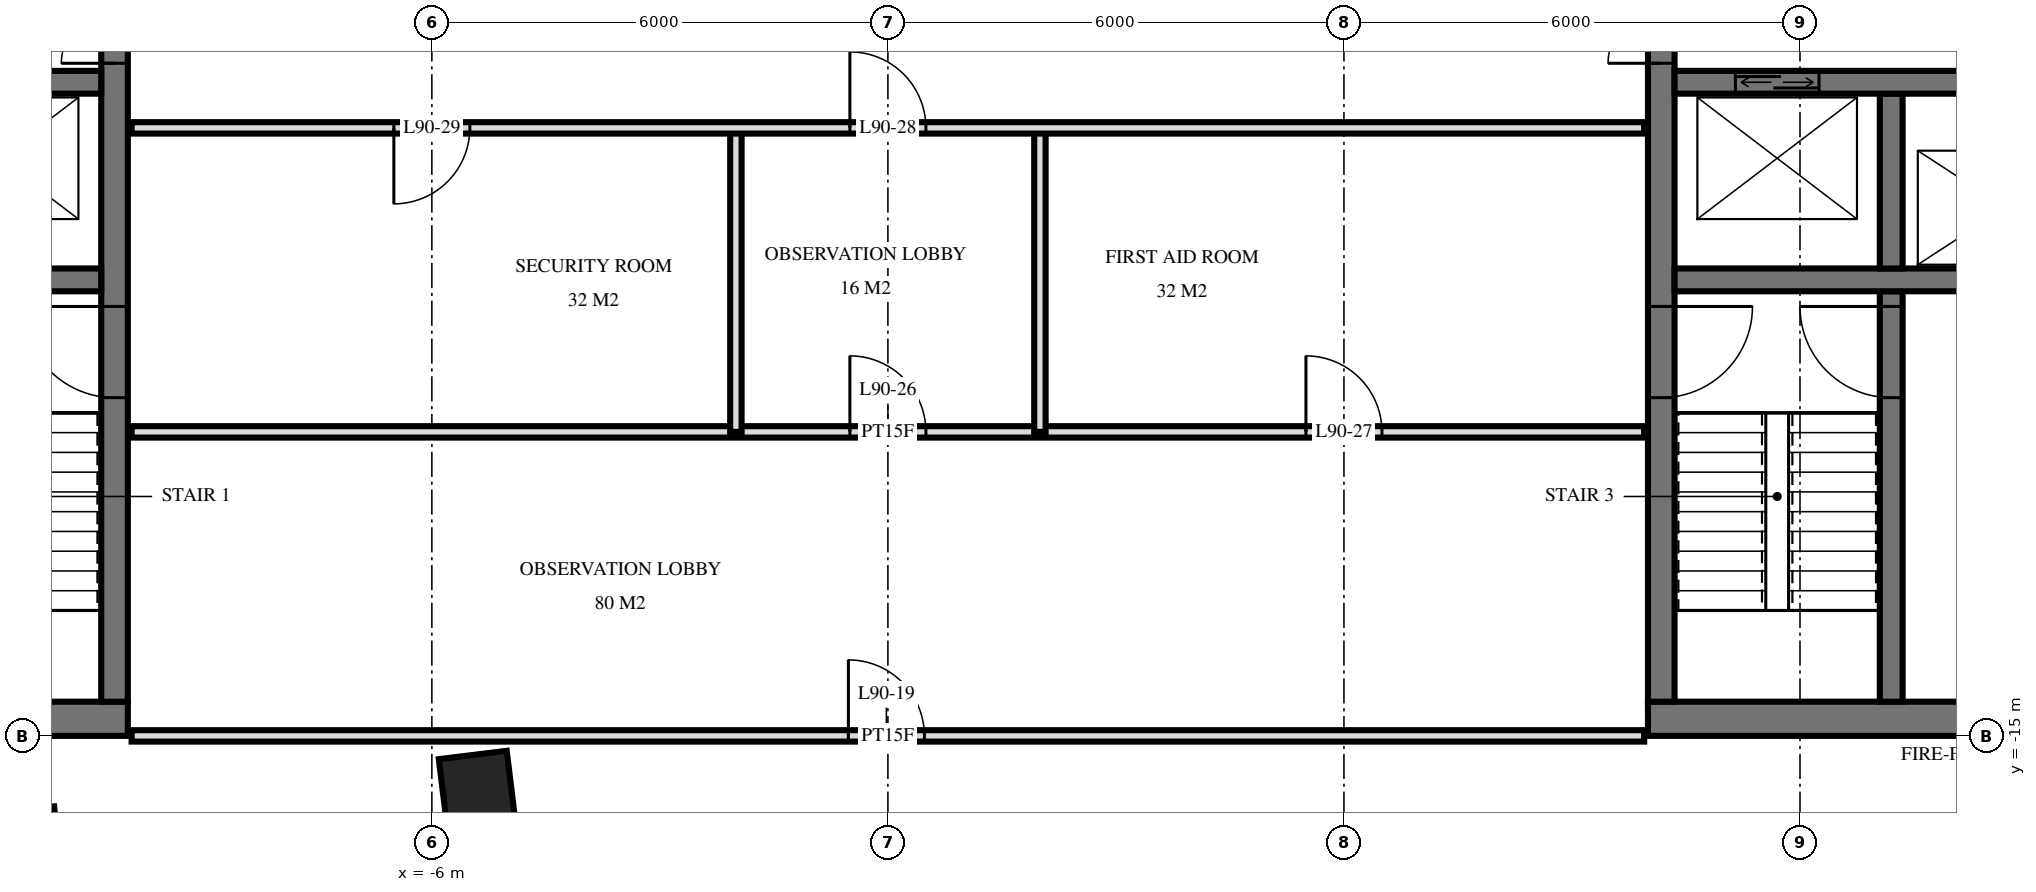
"""IFC4 building model, lengths in metres.
Left out: names, types, materials, properties, quantities, classifications, styles, units other than length and angle.
Written with IfcOpenShell. Run it as: python <this file> out.ifc"""

import sys

from ifc_helpers import new_model, si_unit, direction, frame, frame_2d, origin, origin_2d, place, context, subcontext, project, spatial, rectangle, extrude, element, fill, save


model = new_model("IFC4")
c1 = context("Model", 3, precision=1e-05, world=origin(), true_north=direction((0.0, 1.0)))
c2 = subcontext(c1, "Body", "Model", "MODEL_VIEW")
j1 = project(units=[si_unit("LENGTHUNIT", "METRE"), si_unit("PLANEANGLEUNIT", "RADIAN")], contexts=[c1])
p1 = place(None, origin())
s1 = spatial("IfcSite", under=j1, at=p1, CompositionType="ELEMENT")
p2 = place(p1, origin())
s2 = spatial("IfcBuilding", under=s1, at=p2, CompositionType="ELEMENT")
p3 = place(p2, frame((0.0, 0.0, 342.6)))
s3 = spatial("IfcBuildingStorey", under=s2, at=p3, CompositionType="ELEMENT", Elevation=342.6)
for number, where, z_axis, x_axis in (
    (1, (-11.362, -16.429, 0.0), (0.0, 0.0, 1.0), (0.993, 0.122, 0.0)),
    (2, (-5.407, -15.698, 0.0), (0.0, 0.0, 1.0), (0.993, 0.122, 0.0)),
):
    element("IfcColumn", number, at=place(p3, frame(where, z_axis=z_axis, x_axis=x_axis)), inside=s3, PredefinedType="COLUMN", context=c2, shape_type="SweptSolid", body=[
        extrude(rectangle(XDim=0.9, YDim=0.9, at=origin_2d()), origin(), (0.0, 0.0, 1.0), 4.0),
    ])
p4 = place(p3, frame((-19.5, -14.775, 0.0), z_axis=(0.0, 0.0, 1.0), x_axis=(1.0, 0.0, 0.0)))
e3 = element("IfcWall", 3, at=p4, inside=s3, PredefinedType="SHEAR", context=c2, shape_type="SweptSolid", body=[
    extrude(rectangle(XDim=9.5, YDim=0.45, at=frame_2d((4.75, 0.0))), origin(), (0.0, 0.0, 1.0), 4.0),
])
p5 = place(p4, frame((1.2, 0.0, 0.0)))
e4 = element("IfcOpeningElement", 4, at=p5, cuts=e3, PredefinedType="OPENING", context=c2, shape_type="SweptSolid", body=[
    extrude(rectangle(XDim=1.2, YDim=2.1, at=frame_2d((0.6, 1.05))), frame((0.0, 0.235, 0.0), z_axis=(0.0, -1.0, 0.0), x_axis=(1.0, 0.0, 0.0)), (0.0, 0.0, 1.0), 0.47),
])
p6 = place(p4, frame((4.25, 0.0, 0.0)))
e5 = element("IfcOpeningElement", 5, at=p6, cuts=e3, PredefinedType="OPENING", context=c2, shape_type="SweptSolid", body=[
    extrude(rectangle(XDim=1.1, YDim=2.1, at=frame_2d((0.55, 1.05))), frame((0.0, 0.235, 0.0), z_axis=(0.0, -1.0, 0.0), x_axis=(1.0, 0.0, 0.0)), (0.0, 0.0, 1.0), 0.47),
])
p7 = place(p3, frame((-10.175, -14.55, 0.0), z_axis=(0.0, 0.0, 1.0), x_axis=(0.0, 1.0, 0.0)))
e6 = element("IfcWall", 6, at=p7, inside=s3, PredefinedType="SHEAR", context=c2, shape_type="SweptSolid", body=[
    extrude(rectangle(XDim=14.1, YDim=0.35, at=frame_2d((7.05, 0.0))), origin(), (0.0, 0.0, 1.0), 4.0),
])
p8 = place(p7, frame((8.4, 0.0, 0.0)))
e7 = element("IfcOpeningElement", 7, at=p8, cuts=e6, PredefinedType="OPENING", context=c2, shape_type="SweptSolid", body=[
    extrude(rectangle(XDim=1.4, YDim=2.4, at=frame_2d((0.7, 1.2))), frame((0.0, 0.185, 0.0), z_axis=(0.0, -1.0, 0.0), x_axis=(1.0, 0.0, 0.0)), (0.0, 0.0, 1.0), 0.37),
])
p9 = place(p7, frame((10.0, 0.0, 0.0)))
e8 = element("IfcOpeningElement", 8, at=p9, cuts=e6, PredefinedType="OPENING", context=c2, shape_type="SweptSolid", body=[
    extrude(rectangle(XDim=1.4, YDim=2.4, at=frame_2d((0.7, 1.2))), frame((0.0, 0.185, 0.0), z_axis=(0.0, -1.0, 0.0), x_axis=(1.0, 0.0, 0.0)), (0.0, 0.0, 1.0), 0.37),
])
p10 = place(p7, frame((4.0, 0.0, 0.0)))
e9 = element("IfcOpeningElement", 9, at=p10, cuts=e6, PredefinedType="OPENING", context=c2, shape_type="SweptSolid", body=[
    extrude(rectangle(XDim=1.2, YDim=2.1, at=frame_2d((0.6, 1.05))), frame((0.0, 0.185, 0.0), z_axis=(0.0, -1.0, 0.0), x_axis=(1.0, 0.0, 0.0)), (0.0, 0.0, 1.0), 0.37),
])
p11 = place(p3, frame((-19.05, -6.4, 0.0), z_axis=(0.0, 0.0, 1.0), x_axis=(1.0, 0.0, 0.0)))
e10 = element("IfcWall", 10, at=p11, inside=s3, PredefinedType="SHEAR", context=c2, shape_type="SweptSolid", body=[
    extrude(rectangle(XDim=8.7, YDim=0.3, at=frame_2d((4.35, 0.0))), origin(), (0.0, 0.0, 1.0), 4.0),
])
p12 = place(p11, frame((6.8, 0.0, 0.0)))
e11 = element("IfcOpeningElement", 11, at=p12, cuts=e10, PredefinedType="OPENING", context=c2, shape_type="SweptSolid", body=[
    extrude(rectangle(XDim=1.1, YDim=2.1, at=frame_2d((0.55, 1.05))), frame((0.0, 0.16, 0.0), z_axis=(0.0, -1.0, 0.0), x_axis=(1.0, 0.0, 0.0)), (0.0, 0.0, 1.0), 0.32),
])
p13 = place(p11, frame((0.8, 0.0, 0.0)))
e12 = element("IfcOpeningElement", 12, at=p13, cuts=e10, PredefinedType="OPENING", context=c2, shape_type="SweptSolid", body=[
    extrude(rectangle(XDim=1.1, YDim=2.1, at=frame_2d((0.55, 1.05))), frame((0.0, 0.16, 0.0), z_axis=(0.0, -1.0, 0.0), x_axis=(1.0, 0.0, 0.0)), (0.0, 0.0, 1.0), 0.32),
])
p14 = place(p3, frame((-19.05, -9.0, 0.0), z_axis=(0.0, 0.0, 1.0), x_axis=(1.0, 0.0, 0.0)))
e13 = element("IfcWall", 13, at=p14, inside=s3, PredefinedType="SHEAR", context=c2, shape_type="SweptSolid", body=[
    extrude(rectangle(XDim=8.7, YDim=0.3, at=frame_2d((4.35, 0.0))), origin(), (0.0, 0.0, 1.0), 4.0),
])
p15 = place(p14, frame((3.8, 0.0, 0.0)))
e14 = element("IfcOpeningElement", 14, at=p15, cuts=e13, PredefinedType="OPENING", context=c2, shape_type="SweptSolid", body=[
    extrude(rectangle(XDim=1.1, YDim=2.1, at=frame_2d((0.55, 1.05))), frame((0.0, 0.16, 0.0), z_axis=(0.0, -1.0, 0.0), x_axis=(1.0, 0.0, 0.0)), (0.0, 0.0, 1.0), 0.32),
])
p16 = place(p3, frame((10.0, -14.775, 0.0), z_axis=(0.0, 0.0, 1.0), x_axis=(1.0, 0.0, 0.0)))
e15 = element("IfcWall", 15, at=p16, inside=s3, PredefinedType="SHEAR", context=c2, shape_type="SweptSolid", body=[
    extrude(rectangle(XDim=9.5, YDim=0.45, at=frame_2d((4.75, 0.0))), origin(), (0.0, 0.0, 1.0), 4.0),
])
p17 = place(p16, frame((7.1, 0.0, 0.0)))
e16 = element("IfcOpeningElement", 16, at=p17, cuts=e15, PredefinedType="OPENING", context=c2, shape_type="SweptSolid", body=[
    extrude(rectangle(XDim=1.2, YDim=2.1, at=frame_2d((0.6, 1.05))), frame((0.0, 0.235, 0.0), z_axis=(0.0, -1.0, 0.0), x_axis=(1.0, 0.0, 0.0)), (0.0, 0.0, 1.0), 0.47),
])
p18 = place(p16, frame((4.15, 0.0, 0.0)))
e17 = element("IfcOpeningElement", 17, at=p18, cuts=e15, PredefinedType="OPENING", context=c2, shape_type="SweptSolid", body=[
    extrude(rectangle(XDim=1.1, YDim=2.1, at=frame_2d((0.55, 1.05))), frame((0.0, 0.235, 0.0), z_axis=(0.0, -1.0, 0.0), x_axis=(1.0, 0.0, 0.0)), (0.0, 0.0, 1.0), 0.47),
])
p19 = place(p3, frame((10.175, -14.55, 0.0), z_axis=(0.0, 0.0, 1.0), x_axis=(0.0, 1.0, 0.0)))
e18 = element("IfcWall", 18, at=p19, inside=s3, PredefinedType="SHEAR", context=c2, shape_type="SweptSolid", body=[
    extrude(rectangle(XDim=14.1, YDim=0.35, at=frame_2d((7.05, 0.0))), origin(), (0.0, 0.0, 1.0), 4.0),
])
p20 = place(p19, frame((8.4, 0.0, 0.0)))
e19 = element("IfcOpeningElement", 19, at=p20, cuts=e18, PredefinedType="OPENING", context=c2, shape_type="SweptSolid", body=[
    extrude(rectangle(XDim=1.4, YDim=2.4, at=frame_2d((0.7, 1.2))), frame((0.0, 0.185, 0.0), z_axis=(0.0, -1.0, 0.0), x_axis=(1.0, 0.0, 0.0)), (0.0, 0.0, 1.0), 0.37),
])
p21 = place(p19, frame((10.0, 0.0, 0.0)))
e20 = element("IfcOpeningElement", 20, at=p21, cuts=e18, PredefinedType="OPENING", context=c2, shape_type="SweptSolid", body=[
    extrude(rectangle(XDim=1.4, YDim=2.4, at=frame_2d((0.7, 1.2))), frame((0.0, 0.185, 0.0), z_axis=(0.0, -1.0, 0.0), x_axis=(1.0, 0.0, 0.0)), (0.0, 0.0, 1.0), 0.37),
])
p22 = place(p19, frame((4.0, 0.0, 0.0)))
e21 = element("IfcOpeningElement", 21, at=p22, cuts=e18, PredefinedType="OPENING", context=c2, shape_type="SweptSolid", body=[
    extrude(rectangle(XDim=1.2, YDim=2.1, at=frame_2d((0.6, 1.05))), frame((0.0, 0.185, 0.0), z_axis=(0.0, -1.0, 0.0), x_axis=(1.0, 0.0, 0.0)), (0.0, 0.0, 1.0), 0.37),
])
p23 = place(p3, frame((10.35, -6.4, 0.0), z_axis=(0.0, 0.0, 1.0), x_axis=(1.0, 0.0, 0.0)))
e22 = element("IfcWall", 22, at=p23, inside=s3, PredefinedType="SHEAR", context=c2, shape_type="SweptSolid", body=[
    extrude(rectangle(XDim=8.7, YDim=0.3, at=frame_2d((4.35, 0.0))), origin(), (0.0, 0.0, 1.0), 4.0),
])
p24 = place(p23, frame((0.8, 0.0, 0.0)))
e23 = element("IfcOpeningElement", 23, at=p24, cuts=e22, PredefinedType="OPENING", context=c2, shape_type="SweptSolid", body=[
    extrude(rectangle(XDim=1.1, YDim=2.1, at=frame_2d((0.55, 1.05))), frame((0.0, 0.16, 0.0), z_axis=(0.0, -1.0, 0.0), x_axis=(1.0, 0.0, 0.0)), (0.0, 0.0, 1.0), 0.32),
])
p25 = place(p23, frame((6.8, 0.0, 0.0)))
e24 = element("IfcOpeningElement", 24, at=p25, cuts=e22, PredefinedType="OPENING", context=c2, shape_type="SweptSolid", body=[
    extrude(rectangle(XDim=1.1, YDim=2.1, at=frame_2d((0.55, 1.05))), frame((0.0, 0.16, 0.0), z_axis=(0.0, -1.0, 0.0), x_axis=(1.0, 0.0, 0.0)), (0.0, 0.0, 1.0), 0.32),
])
p26 = place(p3, frame((10.35, -9.0, 0.0), z_axis=(0.0, 0.0, 1.0), x_axis=(1.0, 0.0, 0.0)))
e25 = element("IfcWall", 25, at=p26, inside=s3, PredefinedType="SHEAR", context=c2, shape_type="SweptSolid", body=[
    extrude(rectangle(XDim=8.7, YDim=0.3, at=frame_2d((4.35, 0.0))), origin(), (0.0, 0.0, 1.0), 4.0),
])
p27 = place(p26, frame((3.8, 0.0, 0.0)))
e26 = element("IfcOpeningElement", 26, at=p27, cuts=e25, PredefinedType="OPENING", context=c2, shape_type="SweptSolid", body=[
    extrude(rectangle(XDim=1.1, YDim=2.1, at=frame_2d((0.55, 1.05))), frame((0.0, 0.16, 0.0), z_axis=(0.0, -1.0, 0.0), x_axis=(1.0, 0.0, 0.0)), (0.0, 0.0, 1.0), 0.32),
])
p28 = place(p3, frame((13.2, -8.85, 0.0), z_axis=(0.0, 0.0, 1.0), x_axis=(0.0, 1.0, 0.0)))
e27 = element("IfcWall", 27, at=p28, inside=s3, PredefinedType="SHEAR", context=c2, shape_type="SweptSolid", body=[
    extrude(rectangle(XDim=2.3, YDim=0.3, at=frame_2d((1.15, 0.0))), origin(), (0.0, 0.0, 1.0), 4.0),
])
p29 = place(p3, frame((13.2, -14.55, 0.0), z_axis=(0.0, 0.0, 1.0), x_axis=(0.0, 1.0, 0.0)))
e28 = element("IfcWall", 28, at=p29, inside=s3, PredefinedType="SHEAR", context=c2, shape_type="SweptSolid", body=[
    extrude(rectangle(XDim=5.4, YDim=0.3, at=frame_2d((2.7, 0.0))), origin(), (0.0, 0.0, 1.0), 4.0),
])
p30 = place(p29, frame((4.0, 0.0, 0.0)))
e29 = element("IfcOpeningElement", 29, at=p30, cuts=e28, PredefinedType="OPENING", context=c2, shape_type="SweptSolid", body=[
    extrude(rectangle(XDim=1.2, YDim=2.1, at=frame_2d((0.6, 1.05))), frame((0.0, 0.16, 0.0), z_axis=(0.0, -1.0, 0.0), x_axis=(1.0, 0.0, 0.0)), (0.0, 0.0, 1.0), 0.32),
])
for number, where, z_axis, x_axis in (
    (30, (2.0, -11.0, 0.0), (0.0, 0.0, 1.0), (0.0, 1.0, 0.0)),
    (31, (-2.0, -11.0, 0.0), (0.0, 0.0, 1.0), (0.0, 1.0, 0.0)),
):
    element("IfcWall", number, at=place(p3, frame(where, z_axis=z_axis, x_axis=x_axis)), inside=s3, PredefinedType="PARTITIONING", context=c2, shape_type="SweptSolid", body=[
        extrude(rectangle(XDim=4.0, YDim=0.15, at=frame_2d((2.0, 0.0))), origin(), (0.0, 0.0, 1.0), 3.72),
    ])
p31 = place(p3, frame((-9.95, -15.0, 0.0), z_axis=(0.0, 0.0, 1.0), x_axis=(1.0, 0.0, 0.0)))
e32 = element("IfcWall", 32, at=p31, inside=s3, PredefinedType="PARTITIONING", context=c2, shape_type="SweptSolid", body=[
    extrude(rectangle(XDim=19.9, YDim=0.15, at=frame_2d((9.95, 0.0))), origin(), (0.0, 0.0, 1.0), 3.084),
])
p32 = place(p31, frame((9.43, 0.0, 0.0)))
e33 = element("IfcOpeningElement", 33, at=p32, cuts=e32, PredefinedType="OPENING", context=c2, shape_type="SweptSolid", body=[
    extrude(rectangle(XDim=1.0, YDim=2.1, at=frame_2d((0.5, 1.05))), frame((0.0, 0.085, 0.0), z_axis=(0.0, -1.0, 0.0), x_axis=(1.0, 0.0, 0.0)), (0.0, 0.0, 1.0), 0.17),
])
p33 = place(p3, frame((-9.95, -11.0, 0.0), z_axis=(0.0, 0.0, 1.0), x_axis=(1.0, 0.0, 0.0)))
e34 = element("IfcWall", 34, at=p33, inside=s3, PredefinedType="PARTITIONING", context=c2, shape_type="SweptSolid", body=[
    extrude(rectangle(XDim=19.9, YDim=0.15, at=frame_2d((9.95, 0.0))), origin(), (0.0, 0.0, 1.0), 3.72),
])
p34 = place(p33, frame((9.45, 0.0, 0.0)))
e35 = element("IfcOpeningElement", 35, at=p34, cuts=e34, PredefinedType="OPENING", context=c2, shape_type="SweptSolid", body=[
    extrude(rectangle(XDim=1.0, YDim=2.1, at=frame_2d((0.5, 1.05))), frame((0.0, 0.085, 0.0), z_axis=(0.0, -1.0, 0.0), x_axis=(1.0, 0.0, 0.0)), (0.0, 0.0, 1.0), 0.17),
])
p35 = place(p33, frame((15.45, 0.0, 0.0)))
e36 = element("IfcOpeningElement", 36, at=p35, cuts=e34, PredefinedType="OPENING", context=c2, shape_type="SweptSolid", body=[
    extrude(rectangle(XDim=1.0, YDim=2.1, at=frame_2d((0.5, 1.05))), frame((0.0, 0.085, 0.0), z_axis=(0.0, -1.0, 0.0), x_axis=(1.0, 0.0, 0.0)), (0.0, 0.0, 1.0), 0.17),
])
p36 = place(p3, frame((-9.95, -7.0, 0.0), z_axis=(0.0, 0.0, 1.0), x_axis=(1.0, 0.0, 0.0)))
e37 = element("IfcWall", 37, at=p36, inside=s3, PredefinedType="PARTITIONING", context=c2, shape_type="SweptSolid", body=[
    extrude(rectangle(XDim=19.9, YDim=0.15, at=frame_2d((9.95, 0.0))), origin(), (0.0, 0.0, 1.0), 3.72),
])
p37 = place(p36, frame((9.45, 0.0, 0.0)))
e38 = element("IfcOpeningElement", 38, at=p37, cuts=e37, PredefinedType="OPENING", context=c2, shape_type="SweptSolid", body=[
    extrude(rectangle(XDim=1.0, YDim=2.1, at=frame_2d((0.5, 1.05))), frame((0.0, 0.085, 0.0), z_axis=(0.0, -1.0, 0.0), x_axis=(1.0, 0.0, 0.0)), (0.0, 0.0, 1.0), 0.17),
])
p38 = place(p36, frame((3.45, 0.0, 0.0)))
e39 = element("IfcOpeningElement", 39, at=p38, cuts=e37, PredefinedType="OPENING", context=c2, shape_type="SweptSolid", body=[
    extrude(rectangle(XDim=1.0, YDim=2.1, at=frame_2d((0.5, 1.05))), frame((0.0, 0.085, 0.0), z_axis=(0.0, -1.0, 0.0), x_axis=(1.0, 0.0, 0.0)), (0.0, 0.0, 1.0), 0.17),
])
p39 = place(p24, origin())
e40 = element("IfcDoor", 40, at=p39, inside=s3, OperationType="DOUBLE_DOOR_SLIDING", PredefinedType="USERDEFINED", context=c2, shape_type="SweptSolid", body=[
    extrude(rectangle(XDim=1.1, YDim=2.1, at=frame_2d((0.55, 1.05))), frame((0.0, 0.025, 0.0), z_axis=(0.0, -1.0, 0.0), x_axis=(1.0, 0.0, 0.0)), (0.0, 0.0, 1.0), 0.05),
])
fill(e23, e40)
p40 = place(p8, origin())
e41 = element("IfcDoor", 41, at=p40, inside=s3, OperationType="DOUBLE_DOOR_SINGLE_SWING", PredefinedType="DOOR", context=c2, shape_type="SweptSolid", body=[
    extrude(rectangle(XDim=1.4, YDim=2.4, at=frame_2d((0.7, 1.2))), frame((0.0, 0.025, 0.0), z_axis=(0.0, -1.0, 0.0), x_axis=(1.0, 0.0, 0.0)), (0.0, 0.0, 1.0), 0.05),
])
fill(e7, e41)
p41 = place(p10, origin())
e42 = element("IfcDoor", 42, at=p41, inside=s3, OperationType="SINGLE_SWING_LEFT", PredefinedType="DOOR", context=c2, shape_type="SweptSolid", body=[
    extrude(rectangle(XDim=1.2, YDim=2.1, at=frame_2d((0.6, 1.05))), frame((0.0, 0.025, 0.0), z_axis=(0.0, -1.0, 0.0), x_axis=(1.0, 0.0, 0.0)), (0.0, 0.0, 1.0), 0.05),
])
fill(e9, e42)
p42 = place(p20, origin())
e43 = element("IfcDoor", 43, at=p42, inside=s3, OperationType="DOUBLE_DOOR_SINGLE_SWING", PredefinedType="DOOR", context=c2, shape_type="SweptSolid", body=[
    extrude(rectangle(XDim=1.4, YDim=2.4, at=frame_2d((0.7, 1.2))), frame((0.0, 0.025, 0.0), z_axis=(0.0, -1.0, 0.0), x_axis=(1.0, 0.0, 0.0)), (0.0, 0.0, 1.0), 0.05),
])
fill(e19, e43)
p43 = place(p22, frame((0.6, 0.0, 0.0), z_axis=(0.0, 0.0, 1.0), x_axis=(-1.0, 0.0, 0.0)))
e44 = element("IfcDoor", 44, at=p43, inside=s3, OperationType="SINGLE_SWING_RIGHT", PredefinedType="DOOR", context=c2, shape_type="SweptSolid", body=[
    extrude(rectangle(XDim=1.2, YDim=2.1, at=frame_2d((0.0, 1.05))), frame((0.0, -0.025, 0.0), z_axis=(0.0, 1.0, 0.0), x_axis=(-1.0, 0.0, 0.0)), (0.0, 0.0, 1.0), 0.05),
])
fill(e21, e44)
p44 = place(p30, origin())
e45 = element("IfcDoor", 45, at=p44, inside=s3, OperationType="SINGLE_SWING_LEFT", PredefinedType="DOOR", context=c2, shape_type="SweptSolid", body=[
    extrude(rectangle(XDim=1.2, YDim=2.1, at=frame_2d((0.6, 1.05))), frame((0.0, 0.025, 0.0), z_axis=(0.0, -1.0, 0.0), x_axis=(1.0, 0.0, 0.0)), (0.0, 0.0, 1.0), 0.05),
])
fill(e29, e45)
p45 = place(p32, origin())
e46 = element("IfcDoor", 46, at=p45, inside=s3, OperationType="SINGLE_SWING_RIGHT", PredefinedType="DOOR", context=c2, shape_type="SweptSolid", body=[
    extrude(rectangle(XDim=1.0, YDim=2.1, at=frame_2d((0.5, 1.05))), frame((0.0, 0.025, 0.0), z_axis=(0.0, -1.0, 0.0), x_axis=(1.0, 0.0, 0.0)), (0.0, 0.0, 1.0), 0.05),
])
fill(e33, e46)
p46 = place(p34, origin())
e47 = element("IfcDoor", 47, at=p46, inside=s3, OperationType="SINGLE_SWING_RIGHT", PredefinedType="DOOR", context=c2, shape_type="SweptSolid", body=[
    extrude(rectangle(XDim=1.0, YDim=2.1, at=frame_2d((0.5, 1.05))), frame((0.0, 0.025, 0.0), z_axis=(0.0, -1.0, 0.0), x_axis=(1.0, 0.0, 0.0)), (0.0, 0.0, 1.0), 0.05),
])
fill(e35, e47)
p47 = place(p35, origin())
e48 = element("IfcDoor", 48, at=p47, inside=s3, OperationType="SINGLE_SWING_RIGHT", PredefinedType="DOOR", context=c2, shape_type="SweptSolid", body=[
    extrude(rectangle(XDim=1.0, YDim=2.1, at=frame_2d((0.5, 1.05))), frame((0.0, 0.025, 0.0), z_axis=(0.0, -1.0, 0.0), x_axis=(1.0, 0.0, 0.0)), (0.0, 0.0, 1.0), 0.05),
])
fill(e36, e48)
p48 = place(p37, origin())
e49 = element("IfcDoor", 49, at=p48, inside=s3, OperationType="SINGLE_SWING_RIGHT", PredefinedType="DOOR", context=c2, shape_type="SweptSolid", body=[
    extrude(rectangle(XDim=1.0, YDim=2.1, at=frame_2d((0.5, 1.05))), frame((0.0, 0.025, 0.0), z_axis=(0.0, -1.0, 0.0), x_axis=(1.0, 0.0, 0.0)), (0.0, 0.0, 1.0), 0.05),
])
fill(e38, e49)
p49 = place(p38, frame((0.5, 0.0, 0.0), z_axis=(0.0, 0.0, 1.0), x_axis=(-1.0, 0.0, 0.0)))
e50 = element("IfcDoor", 50, at=p49, inside=s3, OperationType="SINGLE_SWING_LEFT", PredefinedType="DOOR", context=c2, shape_type="SweptSolid", body=[
    extrude(rectangle(XDim=1.0, YDim=2.1, at=frame_2d((0.0, 1.05))), frame((0.0, -0.025, 0.0), z_axis=(0.0, 1.0, 0.0), x_axis=(-1.0, 0.0, 0.0)), (0.0, 0.0, 1.0), 0.05),
])
fill(e39, e50)
save(model, sys.argv[1])
